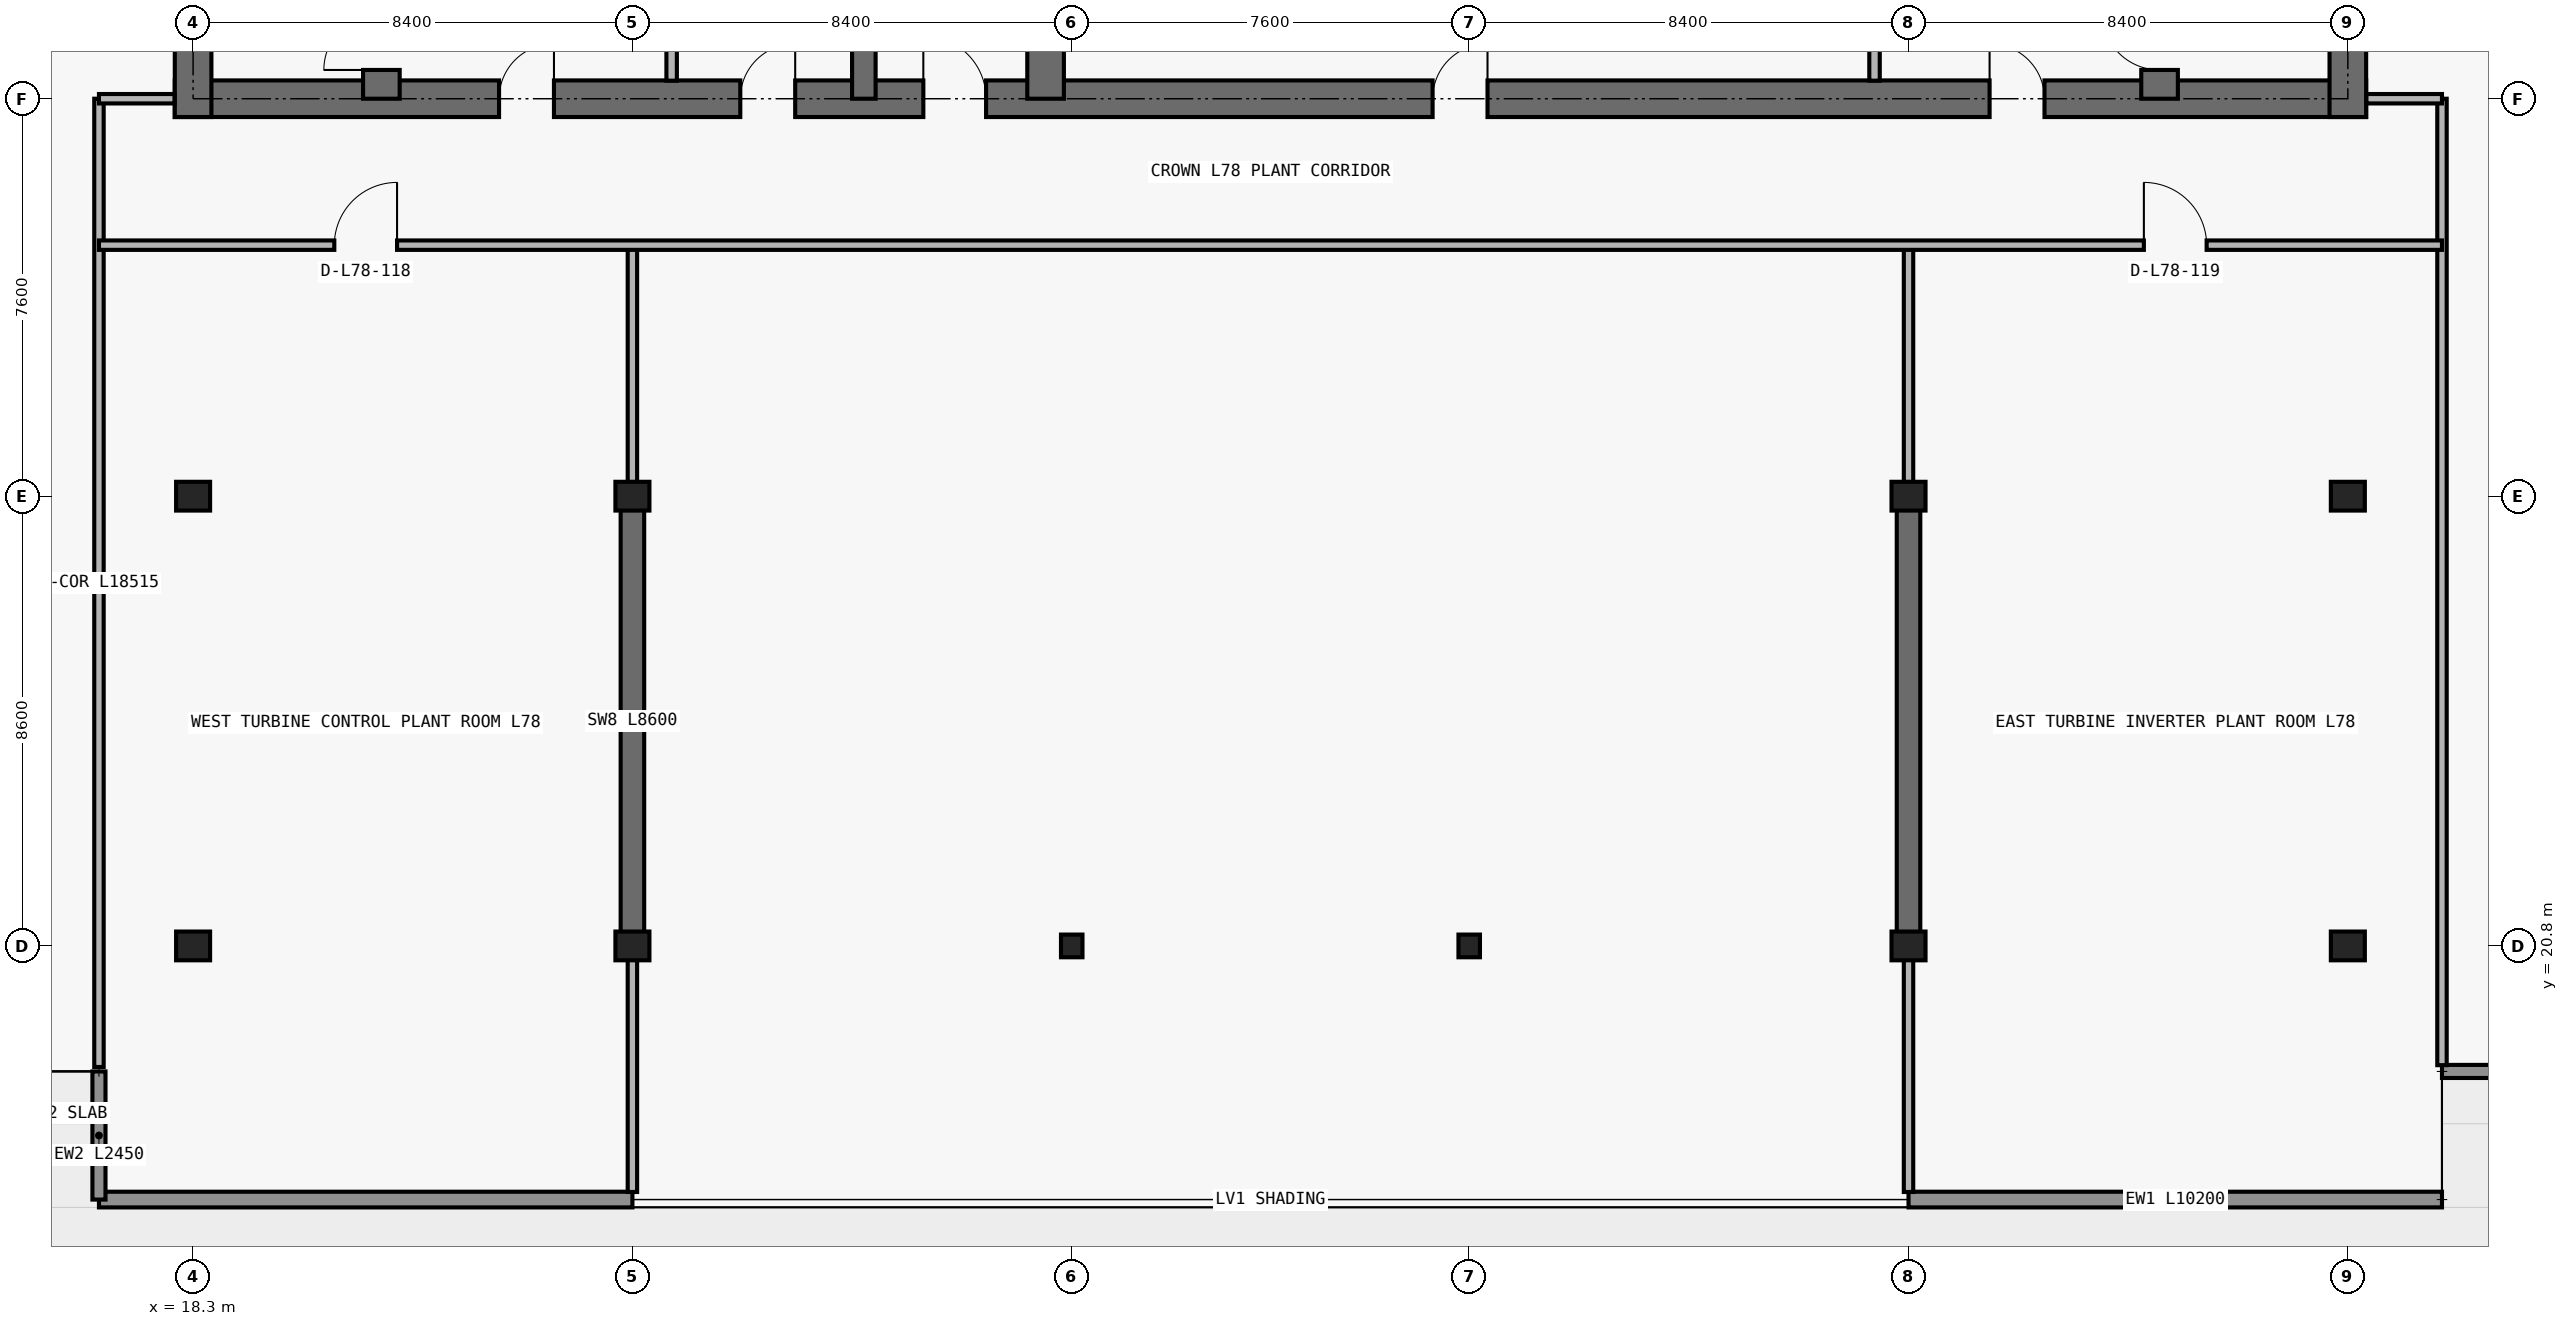
"""IFC4 building model, lengths in metres.
Left out: names, types, materials, properties, quantities, classifications, styles, units other than length and angle.
Written with IfcOpenShell. Run it as: python <this file> out.ifc"""

import sys

from ifc_helpers import new_model, si_unit, direction, frame, frame_2d, origin, origin_2d, place, context, subcontext, project, spatial, rectangle, i_section, extrude, element, fill, save


model = new_model("IFC4")
c1 = context("Model", 3, precision=1e-05, world=origin(), true_north=direction((0.0, 1.0)))
c2 = subcontext(c1, "Body", "Model", "MODEL_VIEW")
j1 = project(units=[si_unit("LENGTHUNIT", "METRE"), si_unit("PLANEANGLEUNIT", "RADIAN")], contexts=[c1])
p1 = place(None, origin())
s1 = spatial("IfcSite", under=j1, at=p1, CompositionType="ELEMENT")
p2 = place(p1, origin())
s2 = spatial("IfcBuilding", under=s1, at=p2, CompositionType="ELEMENT")
p3 = place(p2, frame((0.0, 0.0, 279.4)))
s3 = spatial("IfcBuildingStorey", under=s2, at=p3, CompositionType="ELEMENT", Elevation=279.4)
for number, where, z_axis, x_axis in (
    (1, (18.3, 20.8, 0.0), (0.0, 0.0, 1.0), (1.0, 0.0, 0.0)),
    (2, (26.7, 20.8, 0.0), (0.0, 0.0, 1.0), (1.0, 0.0, 0.0)),
    (3, (51.1, 20.8, 0.0), (0.0, 0.0, 1.0), (1.0, 0.0, 0.0)),
    (4, (59.5, 20.8, 0.0), (0.0, 0.0, 1.0), (1.0, 0.0, 0.0)),
    (5, (18.3, 29.4, 0.0), (0.0, 0.0, 1.0), (1.0, 0.0, 0.0)),
    (6, (26.7, 29.4, 0.0), (0.0, 0.0, 1.0), (1.0, 0.0, 0.0)),
    (7, (51.1, 29.4, 0.0), (0.0, 0.0, 1.0), (1.0, 0.0, 0.0)),
    (8, (59.5, 29.4, 0.0), (0.0, 0.0, 1.0), (1.0, 0.0, 0.0)),
):
    element("IfcColumn", number, at=place(p3, frame(where, z_axis=z_axis, x_axis=x_axis)), inside=s3, PredefinedType="COLUMN", context=c2, shape_type="SweptSolid", body=[
        extrude(rectangle(XDim=0.65, YDim=0.55, at=origin_2d()), origin(), (0.0, 0.0, 1.0), 5.1),
    ])
for number, where, z_axis, x_axis in (
    (9, (35.1, 20.8, 0.0), (0.0, 0.0, 1.0), (1.0, 0.0, 0.0)),
    (10, (42.7, 20.8, 0.0), (0.0, 0.0, 1.0), (1.0, 0.0, 0.0)),
):
    element("IfcColumn", number, at=place(p3, frame(where, z_axis=z_axis, x_axis=x_axis)), inside=s3, PredefinedType="COLUMN", context=c2, shape_type="SweptSolid", body=[
        extrude(i_section(OverallWidth=0.411, OverallDepth=0.434, WebThickness=0.036, FlangeThickness=0.057, FilletRadius=0.015, at=origin_2d()), origin(), (0.0, 0.0, 1.0), 5.4),
    ])
p4 = place(p3, frame((17.95, 37.0, 0.0), z_axis=(0.0, 0.0, 1.0), x_axis=(1.0, 0.0, 0.0)))
e11 = element("IfcWall", 11, at=p4, inside=s3, PredefinedType="SHEAR", context=c2, shape_type="SweptSolid", body=[
    extrude(rectangle(XDim=41.9, YDim=0.7, at=frame_2d((20.95, 0.0))), origin(), (0.0, 0.0, 1.0), 5.1),
])
p5 = place(p4, frame((14.312, 0.0, 0.0)))
e12 = element("IfcOpeningElement", 12, at=p5, cuts=e11, PredefinedType="OPENING", context=c2, shape_type="SweptSolid", body=[
    extrude(rectangle(XDim=1.2, YDim=2.2, at=frame_2d((0.6, 1.1))), frame((0.0, 0.36, 0.0), z_axis=(0.0, -1.0, 0.0), x_axis=(1.0, 0.0, 0.0)), (0.0, 0.0, 1.0), 0.72),
])
p6 = place(p4, frame((6.2, 0.0, 0.0)))
e13 = element("IfcOpeningElement", 13, at=p6, cuts=e11, PredefinedType="OPENING", context=c2, shape_type="SweptSolid", body=[
    extrude(rectangle(XDim=1.05, YDim=2.15, at=frame_2d((0.525, 1.075))), frame((0.0, 0.36, 0.0), z_axis=(0.0, -1.0, 0.0), x_axis=(1.0, 0.0, 0.0)), (0.0, 0.0, 1.0), 0.72),
])
p7 = place(p4, frame((34.7, 0.0, 0.0)))
e14 = element("IfcOpeningElement", 14, at=p7, cuts=e11, PredefinedType="OPENING", context=c2, shape_type="SweptSolid", body=[
    extrude(rectangle(XDim=1.05, YDim=2.15, at=frame_2d((0.525, 1.075))), frame((0.0, 0.36, 0.0), z_axis=(0.0, -1.0, 0.0), x_axis=(1.0, 0.0, 0.0)), (0.0, 0.0, 1.0), 0.72),
])
p8 = place(p4, frame((10.812, 0.0, 0.0)))
e15 = element("IfcOpeningElement", 15, at=p8, cuts=e11, PredefinedType="OPENING", context=c2, shape_type="SweptSolid", body=[
    extrude(rectangle(XDim=1.05, YDim=2.15, at=frame_2d((0.525, 1.075))), frame((0.0, 0.36, 0.0), z_axis=(0.0, -1.0, 0.0), x_axis=(1.0, 0.0, 0.0)), (0.0, 0.0, 1.0), 0.72),
])
p9 = place(p4, frame((24.05, 0.0, 0.0)))
e16 = element("IfcOpeningElement", 16, at=p9, cuts=e11, PredefinedType="OPENING", context=c2, shape_type="SweptSolid", body=[
    extrude(rectangle(XDim=1.05, YDim=2.15, at=frame_2d((0.525, 1.075))), frame((0.0, 0.36, 0.0), z_axis=(0.0, -1.0, 0.0), x_axis=(1.0, 0.0, 0.0)), (0.0, 0.0, 1.0), 0.72),
])
for number, where, z_axis, x_axis in (
    (17, (18.3, 36.65, 0.0), (0.0, 0.0, 1.0), (0.0, 1.0, 0.0)),
    (18, (59.5, 36.65, 0.0), (0.0, 0.0, 1.0), (0.0, 1.0, 0.0)),
):
    element("IfcWall", number, at=place(p3, frame(where, z_axis=z_axis, x_axis=x_axis)), inside=s3, PredefinedType="SHEAR", context=c2, shape_type="SweptSolid", body=[
        extrude(rectangle(XDim=13.95, YDim=0.7, at=frame_2d((6.975, 0.0))), origin(), (0.0, 0.0, 1.0), 5.1),
    ])
p10 = place(p3, frame((21.9, 37.0, 0.0), z_axis=(0.0, 0.0, 1.0), x_axis=(0.0, 1.0, 0.0)))
e19 = element("IfcWall", 19, at=p10, inside=s3, PredefinedType="SHEAR", context=c2, shape_type="SweptSolid", body=[
    extrude(rectangle(XDim=9.575, YDim=0.7, at=frame_2d((4.788, 0.0))), origin(), (0.0, 0.0, 1.0), 5.1),
])
p11 = place(p10, frame((0.55, 0.0, 0.0)))
e20 = element("IfcOpeningElement", 20, at=p11, cuts=e19, PredefinedType="OPENING", context=c2, shape_type="SweptSolid", body=[
    extrude(rectangle(XDim=1.1, YDim=2.15, at=frame_2d((0.55, 1.075))), frame((0.0, 0.36, 0.0), z_axis=(0.0, -1.0, 0.0), x_axis=(1.0, 0.0, 0.0)), (0.0, 0.0, 1.0), 0.72),
])
p12 = place(p3, frame((55.9, 37.0, 0.0), z_axis=(0.0, 0.0, 1.0), x_axis=(0.0, 1.0, 0.0)))
e21 = element("IfcWall", 21, at=p12, inside=s3, PredefinedType="SHEAR", context=c2, shape_type="SweptSolid", body=[
    extrude(rectangle(XDim=9.575, YDim=0.7, at=frame_2d((4.788, 0.0))), origin(), (0.0, 0.0, 1.0), 5.1),
])
p13 = place(p12, frame((0.55, 0.0, 0.0)))
e22 = element("IfcOpeningElement", 22, at=p13, cuts=e21, PredefinedType="OPENING", context=c2, shape_type="SweptSolid", body=[
    extrude(rectangle(XDim=1.1, YDim=2.15, at=frame_2d((0.55, 1.075))), frame((0.0, 0.36, 0.0), z_axis=(0.0, -1.0, 0.0), x_axis=(1.0, 0.0, 0.0)), (0.0, 0.0, 1.0), 0.72),
])
p14 = place(p3, frame((31.125, 37.0, 0.0), z_axis=(0.0, 0.0, 1.0), x_axis=(0.0, 1.0, 0.0)))
e23 = element("IfcWall", 23, at=p14, inside=s3, PredefinedType="SHEAR", context=c2, shape_type="SweptSolid", body=[
    extrude(rectangle(XDim=9.575, YDim=0.45, at=frame_2d((4.788, 0.0))), origin(), (0.0, 0.0, 1.0), 5.1),
])
p15 = place(p3, frame((34.6, 37.0, 0.0), z_axis=(0.0, 0.0, 1.0), x_axis=(0.0, 1.0, 0.0)))
e24 = element("IfcWall", 24, at=p15, inside=s3, PredefinedType="SHEAR", context=c2, shape_type="SweptSolid", body=[
    extrude(rectangle(XDim=9.575, YDim=0.7, at=frame_2d((4.788, 0.0))), origin(), (0.0, 0.0, 1.0), 5.1),
])
for number, where, z_axis, x_axis in (
    (25, (26.7, 20.8, 0.0), (0.0, 0.0, 1.0), (0.0, 1.0, 0.0)),
    (26, (51.1, 20.8, 0.0), (0.0, 0.0, 1.0), (0.0, 1.0, 0.0)),
):
    element("IfcWall", number, at=place(p3, frame(where, z_axis=z_axis, x_axis=x_axis)), inside=s3, PredefinedType="SHEAR", context=c2, shape_type="SweptSolid", body=[
        extrude(rectangle(XDim=8.6, YDim=0.45, at=frame_2d((4.3, 0.0))), origin(), (0.0, 0.0, 1.0), 5.1),
    ])
for number, where, z_axis, x_axis in (
    (27, (61.3, 15.95, 0.0), (0.0, 0.0, 1.0), (-1.0, 0.0, 0.0)),
    (28, (26.7, 15.95, 0.0), (0.0, 0.0, 1.0), (-1.0, 0.0, 0.0)),
):
    element("IfcWall", number, at=place(p3, frame(where, z_axis=z_axis, x_axis=x_axis)), inside=s3, PredefinedType="STANDARD", context=c2, shape_type="SweptSolid", body=[
        extrude(rectangle(XDim=10.2, YDim=0.3, at=frame_2d((5.1, 0.0))), origin(), (0.0, 0.0, 1.0), 5.1),
    ])
p16 = place(p3, frame((16.5, 18.4, 0.0), z_axis=(0.0, 0.0, 1.0), x_axis=(0.0, -1.0, 0.0)))
e29 = element("IfcWall", 29, at=p16, inside=s3, PredefinedType="ELEMENTEDWALL", context=c2, shape_type="SweptSolid", body=[
    extrude(rectangle(XDim=2.45, YDim=0.25, at=frame_2d((1.225, 0.0))), origin(), (0.0, 0.0, 1.0), 5.1),
])
p17 = place(p3, frame((61.3, 18.4, 0.0), z_axis=(0.0, 0.0, 1.0), x_axis=(1.0, 0.0, 0.0)))
e30 = element("IfcWall", 30, at=p17, inside=s3, PredefinedType="ELEMENTEDWALL", context=c2, shape_type="SweptSolid", body=[
    extrude(rectangle(XDim=2.65, YDim=0.25, at=frame_2d((1.325, 0.0))), origin(), (0.0, 0.0, 1.0), 5.1),
])
p18 = place(p3, frame((16.5, 18.485, 0.0), z_axis=(0.0, 0.0, 1.0), x_axis=(0.0, 1.0, 0.0)))
e31 = element("IfcWall", 31, at=p18, inside=s3, PredefinedType="PARTITIONING", context=c2, shape_type="SweptSolid", body=[
    extrude(rectangle(XDim=18.515, YDim=0.18, at=frame_2d((9.257, 0.0))), origin(), (0.0, 0.0, 1.0), 5.1),
])
p19 = place(p3, frame((26.7, 16.095, 0.0), z_axis=(0.0, 0.0, 1.0), x_axis=(0.0, 1.0, 0.0)))
e32 = element("IfcWall", 32, at=p19, inside=s3, PredefinedType="PARTITIONING", context=c2, shape_type="SweptSolid", body=[
    extrude(rectangle(XDim=4.7, YDim=0.18, at=frame_2d((2.35, 0.0))), origin(), (0.0, 0.0, 1.0), 5.1),
])
p20 = place(p3, frame((26.7, 29.405, 0.0), z_axis=(0.0, 0.0, 1.0), x_axis=(0.0, 1.0, 0.0)))
e33 = element("IfcWall", 33, at=p20, inside=s3, PredefinedType="PARTITIONING", context=c2, shape_type="SweptSolid", body=[
    extrude(rectangle(XDim=4.795, YDim=0.18, at=frame_2d((2.397, 0.0))), origin(), (0.0, 0.0, 1.0), 4.385),
])
for number, where, z_axis, x_axis in (
    (34, (27.45, 37.345, 0.0), (0.0, 0.0, 1.0), (0.0, 1.0, 0.0)),
    (35, (50.45, 37.345, 0.0), (0.0, 0.0, 1.0), (0.0, 1.0, 0.0)),
):
    element("IfcWall", number, at=place(p3, frame(where, z_axis=z_axis, x_axis=x_axis)), inside=s3, PredefinedType="PARTITIONING", context=c2, shape_type="SweptSolid", body=[
        extrude(rectangle(XDim=5.385, YDim=0.2, at=frame_2d((2.692, 0.0))), origin(), (0.0, 0.0, 1.0), 5.1),
    ])
p21 = place(p3, frame((51.1, 16.095, 0.0), z_axis=(0.0, 0.0, 1.0), x_axis=(0.0, 1.0, 0.0)))
e36 = element("IfcWall", 36, at=p21, inside=s3, PredefinedType="PARTITIONING", context=c2, shape_type="SweptSolid", body=[
    extrude(rectangle(XDim=4.7, YDim=0.18, at=frame_2d((2.35, 0.0))), origin(), (0.0, 0.0, 1.0), 5.1),
])
p22 = place(p3, frame((51.1, 29.405, 0.0), z_axis=(0.0, 0.0, 1.0), x_axis=(0.0, 1.0, 0.0)))
e37 = element("IfcWall", 37, at=p22, inside=s3, PredefinedType="PARTITIONING", context=c2, shape_type="SweptSolid", body=[
    extrude(rectangle(XDim=4.795, YDim=0.18, at=frame_2d((2.397, 0.0))), origin(), (0.0, 0.0, 1.0), 4.385),
])
p23 = place(p3, frame((61.3, 18.52, 0.0), z_axis=(0.0, 0.0, 1.0), x_axis=(0.0, 1.0, 0.0)))
e38 = element("IfcWall", 38, at=p23, inside=s3, PredefinedType="PARTITIONING", context=c2, shape_type="SweptSolid", body=[
    extrude(rectangle(XDim=18.48, YDim=0.18, at=frame_2d((9.24, 0.0))), origin(), (0.0, 0.0, 1.0), 5.1),
])
p24 = place(p3, frame((16.5, 34.2, 0.0), z_axis=(0.0, 0.0, 1.0), x_axis=(1.0, 0.0, 0.0)))
e39 = element("IfcWall", 39, at=p24, inside=s3, PredefinedType="PARTITIONING", context=c2, shape_type="SweptSolid", body=[
    extrude(rectangle(XDim=44.8, YDim=0.18, at=frame_2d((22.4, 0.0))), origin(), (0.0, 0.0, 1.0), 4.468),
])
p25 = place(p24, frame((4.5, 0.0, 0.0)))
e40 = element("IfcOpeningElement", 40, at=p25, cuts=e39, PredefinedType="OPENING", context=c2, shape_type="SweptSolid", body=[
    extrude(rectangle(XDim=1.2, YDim=2.2, at=frame_2d((0.6, 1.1))), frame((0.0, 0.1, 0.0), z_axis=(0.0, -1.0, 0.0), x_axis=(1.0, 0.0, 0.0)), (0.0, 0.0, 1.0), 0.2),
])
p26 = place(p24, frame((39.1, 0.0, 0.0)))
e41 = element("IfcOpeningElement", 41, at=p26, cuts=e39, PredefinedType="OPENING", context=c2, shape_type="SweptSolid", body=[
    extrude(rectangle(XDim=1.2, YDim=2.2, at=frame_2d((0.6, 1.1))), frame((0.0, 0.1, 0.0), z_axis=(0.0, -1.0, 0.0), x_axis=(1.0, 0.0, 0.0)), (0.0, 0.0, 1.0), 0.2),
])
for number, where, z_axis, x_axis in (
    (42, (16.5, 37.0, 0.0), (0.0, 0.0, 1.0), (1.0, 0.0, 0.0)),
    (43, (59.855, 37.0, 0.0), (0.0, 0.0, 1.0), (1.0, 0.0, 0.0)),
):
    element("IfcWall", number, at=place(p3, frame(where, z_axis=z_axis, x_axis=x_axis)), inside=s3, PredefinedType="PARTITIONING", context=c2, shape_type="SweptSolid", body=[
        extrude(rectangle(XDim=1.445, YDim=0.18, at=frame_2d((0.723, 0.0))), origin(), (0.0, 0.0, 1.0), 5.1),
    ])
p27 = place(p5, origin())
e44 = element("IfcDoor", 44, at=p27, inside=s3, OperationType="SINGLE_SWING_LEFT", PredefinedType="DOOR", context=c2, shape_type="SweptSolid", body=[
    extrude(rectangle(XDim=1.2, YDim=2.2, at=frame_2d((0.6, 1.1))), frame((0.0, 0.025, 0.0), z_axis=(0.0, -1.0, 0.0), x_axis=(1.0, 0.0, 0.0)), (0.0, 0.0, 1.0), 0.05),
])
fill(e12, e44)
p28 = place(p6, origin())
e45 = element("IfcDoor", 45, at=p28, inside=s3, OperationType="SINGLE_SWING_RIGHT", PredefinedType="DOOR", context=c2, shape_type="SweptSolid", body=[
    extrude(rectangle(XDim=1.05, YDim=2.15, at=frame_2d((0.525, 1.075))), frame((0.0, 0.025, 0.0), z_axis=(0.0, -1.0, 0.0), x_axis=(1.0, 0.0, 0.0)), (0.0, 0.0, 1.0), 0.05),
])
fill(e13, e45)
p29 = place(p11, origin())
e46 = element("IfcDoor", 46, at=p29, inside=s3, OperationType="SINGLE_SWING_LEFT", PredefinedType="DOOR", context=c2, shape_type="SweptSolid", body=[
    extrude(rectangle(XDim=1.1, YDim=2.15, at=frame_2d((0.55, 1.075))), frame((0.0, 0.025, 0.0), z_axis=(0.0, -1.0, 0.0), x_axis=(1.0, 0.0, 0.0)), (0.0, 0.0, 1.0), 0.05),
])
fill(e20, e46)
p30 = place(p7, origin())
e47 = element("IfcDoor", 47, at=p30, inside=s3, OperationType="SINGLE_SWING_LEFT", PredefinedType="DOOR", context=c2, shape_type="SweptSolid", body=[
    extrude(rectangle(XDim=1.05, YDim=2.15, at=frame_2d((0.525, 1.075))), frame((0.0, 0.025, 0.0), z_axis=(0.0, -1.0, 0.0), x_axis=(1.0, 0.0, 0.0)), (0.0, 0.0, 1.0), 0.05),
])
fill(e14, e47)
p31 = place(p13, origin())
e48 = element("IfcDoor", 48, at=p31, inside=s3, OperationType="SINGLE_SWING_RIGHT", PredefinedType="DOOR", context=c2, shape_type="SweptSolid", body=[
    extrude(rectangle(XDim=1.1, YDim=2.15, at=frame_2d((0.55, 1.075))), frame((0.0, 0.025, 0.0), z_axis=(0.0, -1.0, 0.0), x_axis=(1.0, 0.0, 0.0)), (0.0, 0.0, 1.0), 0.05),
])
fill(e22, e48)
p32 = place(p8, origin())
e49 = element("IfcDoor", 49, at=p32, inside=s3, OperationType="SINGLE_SWING_RIGHT", PredefinedType="DOOR", context=c2, shape_type="SweptSolid", body=[
    extrude(rectangle(XDim=1.05, YDim=2.15, at=frame_2d((0.525, 1.075))), frame((0.0, 0.025, 0.0), z_axis=(0.0, -1.0, 0.0), x_axis=(1.0, 0.0, 0.0)), (0.0, 0.0, 1.0), 0.05),
])
fill(e15, e49)
p33 = place(p9, origin())
e50 = element("IfcDoor", 50, at=p33, inside=s3, OperationType="SINGLE_SWING_RIGHT", PredefinedType="DOOR", context=c2, shape_type="SweptSolid", body=[
    extrude(rectangle(XDim=1.05, YDim=2.15, at=frame_2d((0.525, 1.075))), frame((0.0, 0.025, 0.0), z_axis=(0.0, -1.0, 0.0), x_axis=(1.0, 0.0, 0.0)), (0.0, 0.0, 1.0), 0.05),
])
fill(e16, e50)
p34 = place(p25, origin())
e51 = element("IfcDoor", 51, at=p34, inside=s3, OperationType="SINGLE_SWING_RIGHT", PredefinedType="DOOR", context=c2, shape_type="SweptSolid", body=[
    extrude(rectangle(XDim=1.2, YDim=2.2, at=frame_2d((0.6, 1.1))), frame((0.0, 0.025, 0.0), z_axis=(0.0, -1.0, 0.0), x_axis=(1.0, 0.0, 0.0)), (0.0, 0.0, 1.0), 0.05),
])
fill(e40, e51)
p35 = place(p26, origin())
e52 = element("IfcDoor", 52, at=p35, inside=s3, OperationType="SINGLE_SWING_LEFT", PredefinedType="DOOR", context=c2, shape_type="SweptSolid", body=[
    extrude(rectangle(XDim=1.2, YDim=2.2, at=frame_2d((0.6, 1.1))), frame((0.0, 0.025, 0.0), z_axis=(0.0, -1.0, 0.0), x_axis=(1.0, 0.0, 0.0)), (0.0, 0.0, 1.0), 0.05),
])
fill(e41, e52)
save(model, sys.argv[1])
